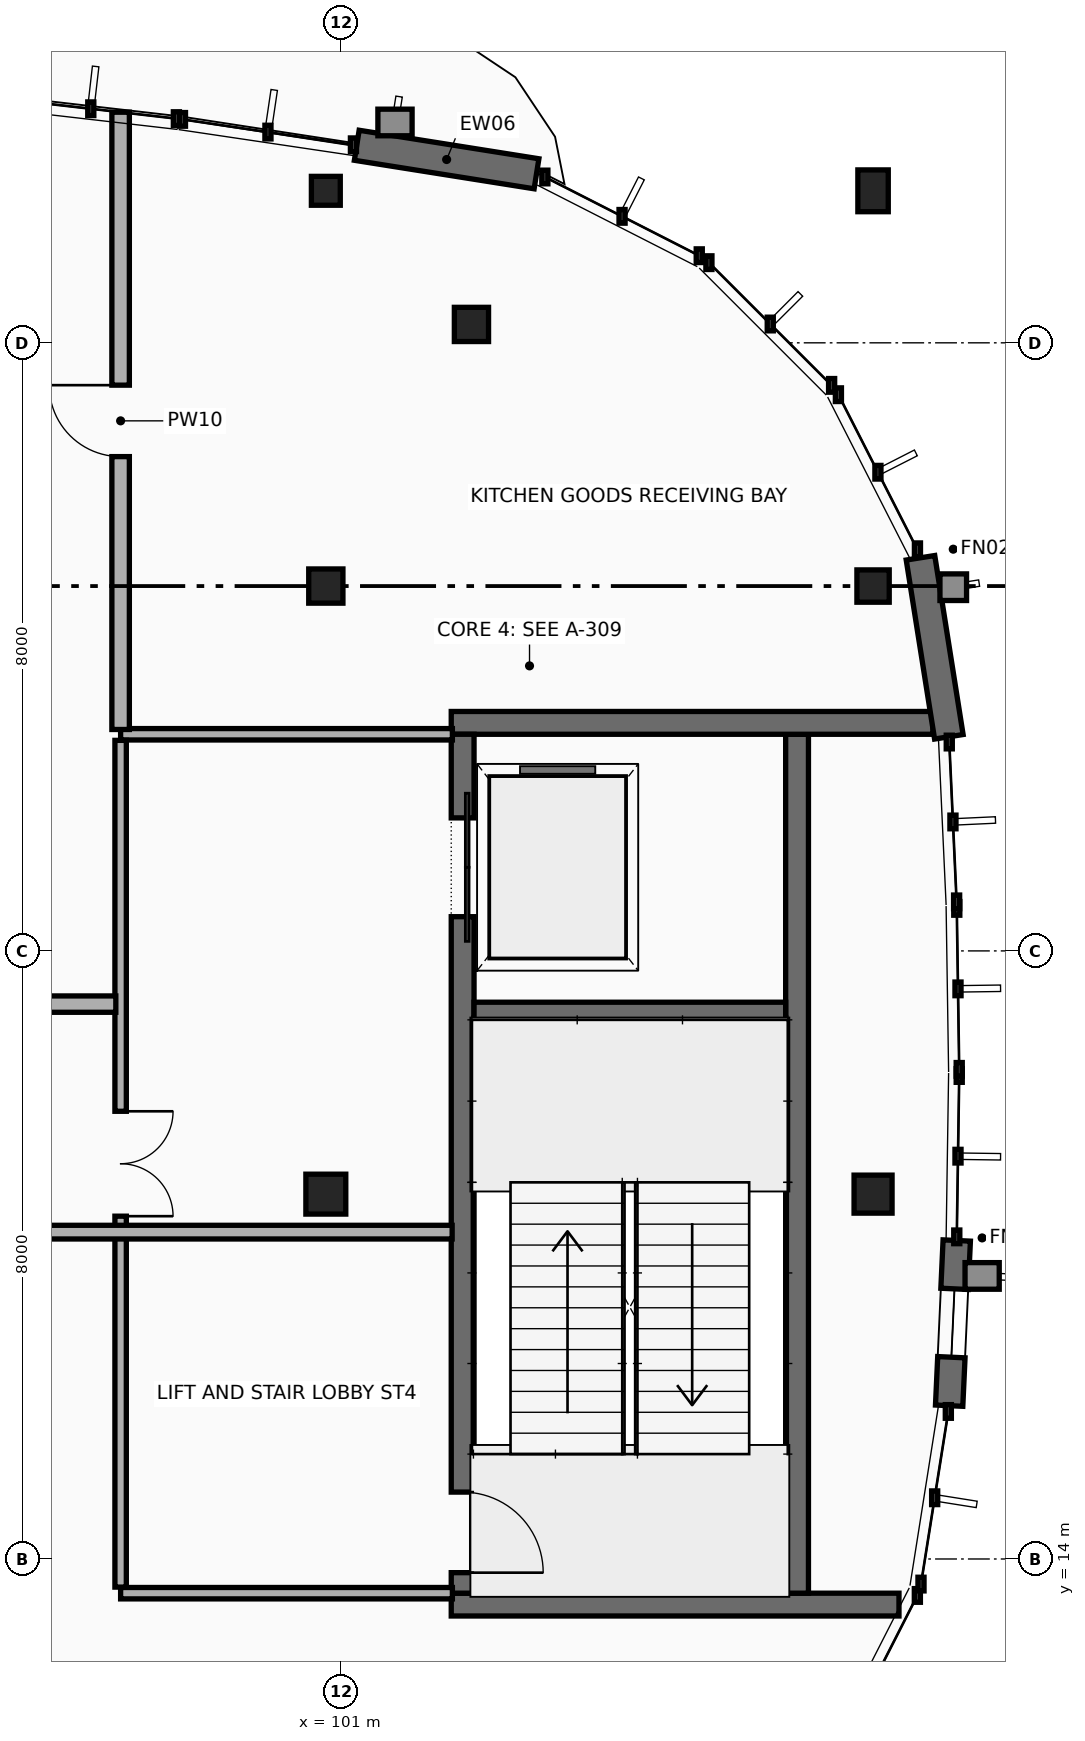
"""IFC4 building model, lengths in metres.
Left out: names, types, materials, properties, quantities, classifications, styles, units other than length and angle.
Written with IfcOpenShell. Run it as: python <this file> out.ifc"""

import sys

from ifc_helpers import new_model, si_unit, direction, frame, frame_2d, origin, origin_2d, place, context, subcontext, project, spatial, rectangle, extrude, element, fill, save


model = new_model("IFC4")
c1 = context("Model", 3, precision=1e-05, world=origin(), true_north=direction((0.0, 1.0)))
c2 = subcontext(c1, "Body", "Model", "MODEL_VIEW")
j1 = project(units=[si_unit("LENGTHUNIT", "METRE"), si_unit("PLANEANGLEUNIT", "RADIAN")], contexts=[c1])
p1 = place(None, origin())
s1 = spatial("IfcSite", under=j1, at=p1, CompositionType="ELEMENT")
p2 = place(p1, origin())
s2 = spatial("IfcBuilding", under=s1, at=p2, CompositionType="ELEMENT")
p3 = place(p2, origin())
s3 = spatial("IfcBuildingStorey", under=s2, at=p3, CompositionType="ELEMENT", Elevation=0.0)
p4 = place(p3, frame((102.45, 13.4, 0.0), z_axis=(0.0, 0.0, 1.0), x_axis=(1.0, 0.0, 0.0)))
e1 = element("IfcWall", 1, at=p4, inside=s3, PredefinedType="SHEAR", context=c2, shape_type="SweptSolid", body=[
    extrude(rectangle(XDim=5.891, YDim=0.3, at=frame_2d((2.946, 0.0))), origin(), (0.0, 0.0, 1.0), 4.8),
])
p5 = place(p3, frame((107.0, 13.55, 0.0), z_axis=(0.0, 0.0, 1.0), x_axis=(0.0, 1.0, 0.0)))
e2 = element("IfcWall", 2, at=p5, inside=s3, PredefinedType="SHEAR", context=c2, shape_type="SweptSolid", body=[
    extrude(rectangle(XDim=11.3, YDim=0.3, at=frame_2d((5.65, 0.0))), origin(), (0.0, 0.0, 1.0), 4.8),
])
p6 = place(p3, frame((108.788, 25.0, 0.0), z_axis=(0.0, 0.0, 1.0), x_axis=(-1.0, 0.0, 0.0)))
e3 = element("IfcWall", 3, at=p6, inside=s3, PredefinedType="SHEAR", context=c2, shape_type="SweptSolid", body=[
    extrude(rectangle(XDim=6.338, YDim=0.3, at=frame_2d((3.169, 0.0))), origin(), (0.0, 0.0, 1.0), 4.8),
])
p7 = place(p3, frame((102.6, 24.85, 0.0), z_axis=(0.0, 0.0, 1.0), x_axis=(0.0, -1.0, 0.0)))
e4 = element("IfcWall", 4, at=p7, inside=s3, PredefinedType="SHEAR", context=c2, shape_type="SweptSolid", body=[
    extrude(rectangle(XDim=11.3, YDim=0.3, at=frame_2d((5.65, 0.0))), origin(), (0.0, 0.0, 1.0), 4.8),
])
p8 = place(p7, frame((1.1, 0.0, 0.0)))
e5 = element("IfcOpeningElement", 5, at=p8, cuts=e4, PredefinedType="OPENING", context=c2, shape_type="SweptSolid", body=[
    extrude(rectangle(XDim=1.3, YDim=2.25, at=frame_2d((0.65, 1.125))), frame((0.0, 0.16, 0.0), z_axis=(0.0, -1.0, 0.0), x_axis=(1.0, 0.0, 0.0)), (0.0, 0.0, 1.0), 0.32),
])
p9 = place(p7, frame((9.97, 0.0, 0.0)))
e6 = element("IfcOpeningElement", 6, at=p9, cuts=e4, PredefinedType="OPENING", context=c2, shape_type="SweptSolid", body=[
    extrude(rectangle(XDim=1.06, YDim=2.15, at=frame_2d((0.53, 1.075))), frame((0.0, 0.16, 0.0), z_axis=(0.0, -1.0, 0.0), x_axis=(1.0, 0.0, 0.0)), (0.0, 0.0, 1.0), 0.32),
])
p10 = place(p3, frame((102.75, 21.2, 0.0), z_axis=(0.0, 0.0, 1.0), x_axis=(1.0, 0.0, 0.0)))
e7 = element("IfcWall", 7, at=p10, inside=s3, PredefinedType="SHEAR", context=c2, shape_type="SweptSolid", body=[
    extrude(rectangle(XDim=4.1, YDim=0.25, at=frame_2d((2.05, 0.0))), origin(), (0.0, 0.0, 1.0), 4.8),
])
p11 = place(p3, frame((100.8, 18.8, 0.0), z_axis=(0.0, 0.0, 1.0), x_axis=(1.0, 0.0, 0.0)))
e8 = element("IfcColumn", 8, at=p11, inside=s3, PredefinedType="COLUMN", context=c2, shape_type="SweptSolid", body=[
    extrude(rectangle(XDim=0.525, YDim=0.525, at=origin_2d()), origin(), (0.0, 0.0, 1.0), 4.8),
])
p12 = place(p3, frame((100.8, 26.8, 0.0), z_axis=(0.0, 0.0, 1.0), x_axis=(1.0, 0.0, 0.0)))
e9 = element("IfcColumn", 9, at=p12, inside=s3, PredefinedType="COLUMN", context=c2, shape_type="SweptSolid", body=[
    extrude(rectangle(XDim=0.45, YDim=0.45, at=origin_2d()), origin(), (0.0, 0.0, 1.0), 4.8),
])
p13 = place(p3, frame((100.8, 32.0, 0.0), z_axis=(0.0, 0.0, 1.0), x_axis=(1.0, 0.0, 0.0)))
e10 = element("IfcColumn", 10, at=p13, inside=s3, PredefinedType="COLUMN", context=c2, shape_type="SweptSolid", body=[
    extrude(rectangle(XDim=0.38, YDim=0.38, at=origin_2d()), origin(), (0.0, 0.0, 1.0), 4.8),
])
p14 = place(p3, frame((108.0, 18.8, 0.0), z_axis=(0.0, 0.0, 1.0), x_axis=(1.0, 0.0, 0.0)))
e11 = element("IfcColumn", 11, at=p14, inside=s3, PredefinedType="COLUMN", context=c2, shape_type="SweptSolid", body=[
    extrude(rectangle(XDim=0.5, YDim=0.5, at=origin_2d()), origin(), (0.0, 0.0, 1.0), 4.8),
])
p15 = place(p3, frame((108.0, 26.8, 0.0), z_axis=(0.0, 0.0, 1.0), x_axis=(1.0, 0.0, 0.0)))
e12 = element("IfcColumn", 12, at=p15, inside=s3, PredefinedType="COLUMN", context=c2, shape_type="SweptSolid", body=[
    extrude(rectangle(XDim=0.425, YDim=0.425, at=origin_2d()), origin(), (0.0, 0.0, 1.0), 4.8),
])
p16 = place(p3, frame((108.0, 32.0, 0.0), z_axis=(0.0, 0.0, 1.0), x_axis=(1.0, 0.0, 0.0)))
e13 = element("IfcColumn", 13, at=p16, inside=s3, PredefinedType="COLUMN", context=c2, shape_type="SweptSolid", body=[
    extrude(rectangle(XDim=0.4, YDim=0.55, at=origin_2d()), origin(), (0.0, 0.0, 1.0), 4.8),
])
p17 = place(p3, frame((102.716, 30.242, 0.0), z_axis=(0.0, 0.0, 1.0), x_axis=(1.0, 0.0, 0.0)))
e14 = element("IfcColumn", 14, at=p17, inside=s3, PredefinedType="COLUMN", context=c2, shape_type="SweptSolid", body=[
    extrude(rectangle(XDim=0.45, YDim=0.45, at=origin_2d()), origin(), (0.0, 0.0, 1.0), 4.553),
])
p18 = place(p3, frame((109.101, 18.19, 0.0), z_axis=(0.0, 0.0, 1.0), x_axis=(-0.046018611105, -0.998940582533, 0.0)))
e15 = element("IfcWall", 15, at=p18, inside=s3, PredefinedType="STANDARD", context=c2, shape_type="SweptSolid", body=[
    extrude(rectangle(XDim=2.175, YDim=0.36, at=frame_2d((1.087, 0.0))), origin(), (0.0, 0.0, 1.0), 4.512),
])
p19 = place(p18, frame((0.637, 0.0, 0.9)))
e16 = element("IfcOpeningElement", 16, at=p19, cuts=e15, PredefinedType="OPENING", context=c2, shape_type="SweptSolid", body=[
    extrude(rectangle(XDim=0.9, YDim=1.2, at=frame_2d((0.45, 0.6))), frame((0.0, 0.19, 0.0), z_axis=(0.0, -1.0, 0.0), x_axis=(1.0, 0.0, 0.0)), (0.0, 0.0, 1.0), 0.38),
])
p20 = place(p3, frame((108.624, 27.172, 0.0), z_axis=(0.0, 0.0, 1.0), x_axis=(0.156440987447, -0.987687307525, 0.0)))
e17 = element("IfcWall", 17, at=p20, inside=s3, PredefinedType="STANDARD", context=c2, shape_type="SweptSolid", body=[
    extrude(rectangle(XDim=2.385, YDim=0.38, at=frame_2d((1.192, 0.0))), origin(), (0.0, 0.0, 1.0), 4.225),
])
p21 = place(p3, frame((101.207, 32.599, 0.0), z_axis=(0.0, 0.0, 1.0), x_axis=(0.987661073589, -0.15660652514, 0.0)))
e18 = element("IfcWall", 18, at=p21, inside=s3, PredefinedType="STANDARD", context=c2, shape_type="SweptSolid", body=[
    extrude(rectangle(XDim=2.395, YDim=0.4, at=frame_2d((1.197, 0.0))), origin(), (0.0, 0.0, 1.0), 4.537),
])
p22 = place(p3, frame((98.1, 13.55, 0.0), z_axis=(0.0, 0.0, 1.0), x_axis=(1.0, 0.0, 0.0)))
e19 = element("IfcWall", 19, at=p22, inside=s3, PredefinedType="PARTITIONING", context=c2, shape_type="SweptSolid", body=[
    extrude(rectangle(XDim=4.365, YDim=0.15, at=frame_2d((2.183, 0.0))), origin(), (0.0, 0.0, 1.0), 3.93),
])
p23 = place(p3, frame((102.465, 24.85, 0.0), z_axis=(0.0, 0.0, 1.0), x_axis=(-1.0, 0.0, 0.0)))
e20 = element("IfcWall", 20, at=p23, inside=s3, PredefinedType="PARTITIONING", context=c2, shape_type="SweptSolid", body=[
    extrude(rectangle(XDim=4.365, YDim=0.15, at=frame_2d((2.183, 0.0))), origin(), (0.0, 0.0, 1.0), 3.88),
])
p24 = place(p3, frame((98.1, 24.77, 0.0), z_axis=(0.0, 0.0, 1.0), x_axis=(0.0, -1.0, 0.0)))
e21 = element("IfcWall", 21, at=p24, inside=s3, PredefinedType="PARTITIONING", context=c2, shape_type="SweptSolid", body=[
    extrude(rectangle(XDim=11.14, YDim=0.15, at=frame_2d((5.57, 0.0))), origin(), (0.0, 0.0, 1.0), 4.117),
])
p25 = place(p24, frame((4.88, 0.0, 0.0)))
e22 = element("IfcOpeningElement", 22, at=p25, cuts=e21, PredefinedType="OPENING", context=c2, shape_type="SweptSolid", body=[
    extrude(rectangle(XDim=1.38, YDim=2.2, at=frame_2d((0.69, 1.1))), frame((0.0, 0.085, 0.0), z_axis=(0.0, -1.0, 0.0), x_axis=(1.0, 0.0, 0.0)), (0.0, 0.0, 1.0), 0.17),
])
p26 = place(p3, frame((69.898, 18.3, 0.0), z_axis=(0.0, 0.0, 1.0), x_axis=(1.0, 0.0, 0.0)))
e23 = element("IfcWall", 23, at=p26, inside=s3, PredefinedType="PARTITIONING", context=c2, shape_type="SweptSolid", body=[
    extrude(rectangle(XDim=32.564, YDim=0.18, at=frame_2d((16.282, 0.0))), origin(), (0.0, 0.0, 1.0), 3.93),
])
p27 = place(p26, frame((15.372, 0.0, 0.0)))
e24 = element("IfcOpeningElement", 24, at=p27, cuts=e23, PredefinedType="OPENING", context=c2, shape_type="SweptSolid", body=[
    extrude(rectangle(XDim=0.94, YDim=2.1, at=frame_2d((0.47, 1.05))), frame((0.0, 0.1, 0.0), z_axis=(0.0, -1.0, 0.0), x_axis=(1.0, 0.0, 0.0)), (0.0, 0.0, 1.0), 0.2),
])
p28 = place(p3, frame((98.037, 21.3, 0.0), z_axis=(0.0, 0.0, 1.0), x_axis=(-1.0, 0.0, 0.0)))
e25 = element("IfcWall", 25, at=p28, inside=s3, PredefinedType="PARTITIONING", context=c2, shape_type="SweptSolid", body=[
    extrude(rectangle(XDim=14.437, YDim=0.215, at=frame_2d((7.219, 0.0))), origin(), (0.0, 0.0, 1.0), 3.93),
])
p29 = place(p28, frame((6.479, 0.0, 0.0)))
e26 = element("IfcOpeningElement", 26, at=p29, cuts=e25, PredefinedType="OPENING", context=c2, shape_type="SweptSolid", body=[
    extrude(rectangle(XDim=1.48, YDim=2.22, at=frame_2d((0.74, 1.11))), frame((0.0, 0.117, 0.0), z_axis=(0.0, -1.0, 0.0), x_axis=(1.0, 0.0, 0.0)), (0.0, 0.0, 1.0), 0.235),
])
p30 = place(p3, frame((98.1, 24.913, 0.0), z_axis=(0.0, 0.0, 1.0), x_axis=(0.0, 1.0, 0.0)))
e27 = element("IfcWall", 27, at=p30, inside=s3, PredefinedType="PARTITIONING", context=c2, shape_type="SweptSolid", body=[
    extrude(rectangle(XDim=8.121, YDim=0.23, at=frame_2d((4.061, 0.0))), origin(), (0.0, 0.0, 1.0), 4.068),
])
p31 = place(p30, frame((3.59, 0.0, 0.0)))
e28 = element("IfcOpeningElement", 28, at=p31, cuts=e27, PredefinedType="OPENING", context=c2, shape_type="SweptSolid", body=[
    extrude(rectangle(XDim=0.94, YDim=2.1, at=frame_2d((0.47, 1.05))), frame((0.0, 0.125, 0.0), z_axis=(0.0, -1.0, 0.0), x_axis=(1.0, 0.0, 0.0)), (0.0, 0.0, 1.0), 0.25),
])
p32 = place(p19, origin())
e29 = element("IfcWindow", 29, at=p32, inside=s3, PartitioningType="SINGLE_PANEL", PredefinedType="WINDOW", context=c2, shape_type="SweptSolid", body=[
    extrude(rectangle(XDim=0.9, YDim=1.2, at=frame_2d((0.45, 0.6))), frame((0.0, 0.03, 0.0), z_axis=(0.0, -1.0, 0.0), x_axis=(1.0, 0.0, 0.0)), (0.0, 0.0, 1.0), 0.06),
])
fill(e16, e29)
p33 = place(p8, origin())
e30 = element("IfcDoor", 30, at=p33, inside=s3, OperationType="DOUBLE_DOOR_SLIDING", PredefinedType="DOOR", context=c2, shape_type="SweptSolid", body=[
    extrude(rectangle(XDim=1.3, YDim=2.25, at=frame_2d((0.65, 1.125))), frame((0.0, 0.025, 0.0), z_axis=(0.0, -1.0, 0.0), x_axis=(1.0, 0.0, 0.0)), (0.0, 0.0, 1.0), 0.05),
])
fill(e5, e30)
p34 = place(p9, origin())
e31 = element("IfcDoor", 31, at=p34, inside=s3, OperationType="SINGLE_SWING_RIGHT", PredefinedType="DOOR", context=c2, shape_type="SweptSolid", body=[
    extrude(rectangle(XDim=1.06, YDim=2.15, at=frame_2d((0.53, 1.075))), frame((0.0, 0.025, 0.0), z_axis=(0.0, -1.0, 0.0), x_axis=(1.0, 0.0, 0.0)), (0.0, 0.0, 1.0), 0.05),
])
fill(e6, e31)
p35 = place(p25, origin())
e32 = element("IfcDoor", 32, at=p35, inside=s3, OperationType="DOUBLE_DOOR_SINGLE_SWING", PredefinedType="DOOR", context=c2, shape_type="SweptSolid", body=[
    extrude(rectangle(XDim=1.38, YDim=2.2, at=frame_2d((0.69, 1.1))), frame((0.0, 0.025, 0.0), z_axis=(0.0, -1.0, 0.0), x_axis=(1.0, 0.0, 0.0)), (0.0, 0.0, 1.0), 0.05),
])
fill(e22, e32)
p36 = place(p31, origin())
e33 = element("IfcDoor", 33, at=p36, inside=s3, OperationType="SINGLE_SWING_RIGHT", PredefinedType="DOOR", context=c2, shape_type="SweptSolid", body=[
    extrude(rectangle(XDim=0.94, YDim=2.1, at=frame_2d((0.47, 1.05))), frame((0.0, 0.025, 0.0), z_axis=(0.0, -1.0, 0.0), x_axis=(1.0, 0.0, 0.0)), (0.0, 0.0, 1.0), 0.05),
])
fill(e28, e33)
save(model, sys.argv[1])
